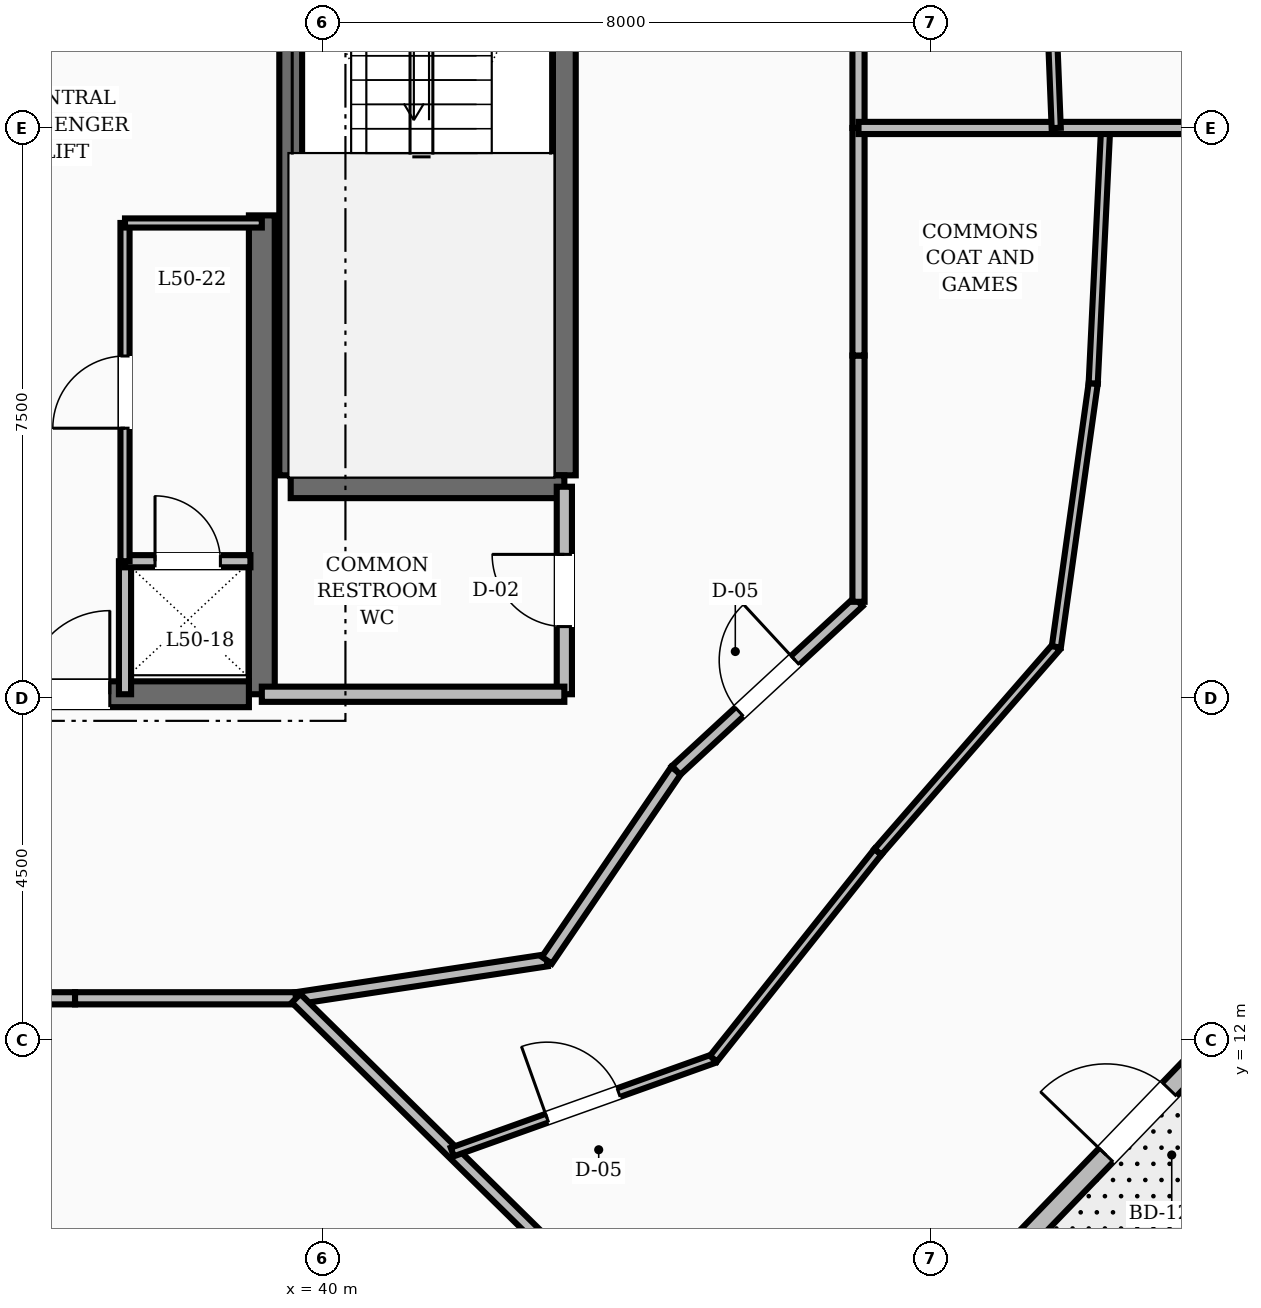
"""IFC4 building model, lengths in metres.
Left out: names, types, materials, properties, quantities, classifications, styles, units other than length and angle.
Written with IfcOpenShell. Run it as: python <this file> out.ifc"""

import sys

from ifc_helpers import new_model, si_unit, direction, frame, frame_2d, origin, place, context, subcontext, project, spatial, rectangle, extrude, element, fill, save


model = new_model("IFC4")
c1 = context("Model", 3, precision=1e-05, world=origin(), true_north=direction((0.0, 1.0)))
c2 = subcontext(c1, "Body", "Model", "MODEL_VIEW")
j1 = project(units=[si_unit("LENGTHUNIT", "METRE"), si_unit("PLANEANGLEUNIT", "RADIAN")], contexts=[c1])
p1 = place(None, origin())
s1 = spatial("IfcSite", under=j1, at=p1, CompositionType="ELEMENT")
p2 = place(p1, origin())
s2 = spatial("IfcBuilding", under=s1, at=p2, CompositionType="ELEMENT")
p3 = place(p2, frame((0.0, 0.0, 192.8)))
s3 = spatial("IfcBuildingStorey", under=s2, at=p3, CompositionType="ELEMENT", Elevation=192.8)
p4 = place(p3, frame((39.2, 16.55, 0.0), z_axis=(0.0, 0.0, 1.0), x_axis=(0.0, 1.0, 0.0)))
e1 = element("IfcWall", 1, at=p4, inside=s3, PredefinedType="SHEAR", context=c2, shape_type="SweptSolid", body=[
    extrude(rectangle(XDim=6.3, YDim=0.34, at=frame_2d((3.15, 0.0))), origin(), (0.0, 0.0, 1.0), 3.6),
])
p5 = place(p3, frame((35.8, 16.55, 0.0), z_axis=(0.0, 0.0, 1.0), x_axis=(1.0, 0.0, 0.0)))
e2 = element("IfcWall", 2, at=p5, inside=s3, PredefinedType="SHEAR", context=c2, shape_type="SweptSolid", body=[
    extrude(rectangle(XDim=3.23, YDim=0.34, at=frame_2d((1.615, 0.0))), origin(), (0.0, 0.0, 1.0), 3.6),
])
p6 = place(p5, frame((0.3, 0.0, 0.0)))
e3 = element("IfcOpeningElement", 3, at=p6, cuts=e2, PredefinedType="OPENING", context=c2, shape_type="SweptSolid", body=[
    extrude(rectangle(XDim=1.1, YDim=2.1, at=frame_2d((0.55, 1.05))), frame((0.0, 0.18, 0.0), z_axis=(0.0, -1.0, 0.0), x_axis=(1.0, 0.0, 0.0)), (0.0, 0.0, 1.0), 0.36),
])
for number, where, z_axis, x_axis in (
    (4, (43.18, 19.43, 0.0), (0.0, 0.0, 1.0), (0.0, 1.0, 0.0)),
    (5, (39.58, 19.43, 0.0), (0.0, 0.0, 1.0), (0.0, 1.0, 0.0)),
):
    element("IfcWall", number, at=place(p3, frame(where, z_axis=z_axis, x_axis=x_axis)), inside=s3, PredefinedType="SHEAR", context=c2, shape_type="SweptSolid", body=[
        extrude(rectangle(XDim=8.74, YDim=0.3, at=frame_2d((4.37, 0.0))), origin(), (0.0, 0.0, 1.0), 3.6),
    ])
p7 = place(p3, frame((39.58, 19.28, 0.0), z_axis=(0.0, 0.0, 1.0), x_axis=(1.0, 0.0, 0.0)))
e6 = element("IfcWall", 6, at=p7, inside=s3, PredefinedType="SHEAR", context=c2, shape_type="SweptSolid", body=[
    extrude(rectangle(XDim=3.6, YDim=0.3, at=frame_2d((1.8, 0.0))), origin(), (0.0, 0.0, 1.0), 3.6),
])
p8 = place(p3, frame((49.211, 9.349, 0.0), z_axis=(0.0, 0.0, 1.0), x_axis=(0.694057872199, 0.719919210772, 0.0)))
e7 = element("IfcWall", 7, at=p8, inside=s3, PredefinedType="STANDARD", context=c2, shape_type="SweptSolid", body=[
    extrude(rectangle(XDim=4.362, YDim=0.26, at=frame_2d((2.181, 0.0))), origin(), (0.0, 0.0, 1.0), 2.82),
])
p9 = place(p8, frame((1.581, 0.0, 0.0)))
e8 = element("IfcOpeningElement", 8, at=p9, cuts=e7, PredefinedType="OPENING", context=c2, shape_type="SweptSolid", body=[
    extrude(rectangle(XDim=1.2, YDim=2.15, at=frame_2d((0.6, 1.075))), frame((0.0, 0.14, 0.0), z_axis=(0.0, -1.0, 0.0), x_axis=(1.0, 0.0, 0.0)), (0.0, 0.0, 1.0), 0.28),
])
p10 = place(p3, frame((43.18, 16.55, 0.0), z_axis=(0.0, 0.0, 1.0), x_axis=(0.0, 1.0, 0.0)))
e9 = element("IfcWall", 9, at=p10, inside=s3, PredefinedType="SOLIDWALL", context=c2, shape_type="SweptSolid", body=[
    extrude(rectangle(XDim=2.73, YDim=0.2, at=frame_2d((1.365, 0.0))), origin(), (0.0, 0.0, 1.0), 2.8),
])
p11 = place(p10, frame((0.89, 0.0, 0.0)))
e10 = element("IfcOpeningElement", 10, at=p11, cuts=e9, PredefinedType="OPENING", context=c2, shape_type="SweptSolid", body=[
    extrude(rectangle(XDim=0.95, YDim=2.1, at=frame_2d((0.475, 1.05))), frame((0.0, 0.11, 0.0), z_axis=(0.0, -1.0, 0.0), x_axis=(1.0, 0.0, 0.0)), (0.0, 0.0, 1.0), 0.22),
])
p12 = place(p3, frame((39.2, 16.55, 0.0), z_axis=(0.0, 0.0, 1.0), x_axis=(1.0, 0.0, 0.0)))
e11 = element("IfcWall", 11, at=p12, inside=s3, PredefinedType="SOLIDWALL", context=c2, shape_type="SweptSolid", body=[
    extrude(rectangle(XDim=3.98, YDim=0.2, at=frame_2d((1.99, 0.0))), origin(), (0.0, 0.0, 1.0), 2.8),
])
p13 = place(p3, frame((37.4, 16.55, 0.0), z_axis=(0.0, 0.0, 1.0), x_axis=(0.0, 1.0, 0.0)))
e12 = element("IfcWall", 12, at=p13, inside=s3, PredefinedType="SOLIDWALL", context=c2, shape_type="SweptSolid", body=[
    extrude(rectangle(XDim=1.75, YDim=0.16, at=frame_2d((0.875, 0.0))), origin(), (0.0, 0.0, 1.0), 2.8),
])
p14 = place(p3, frame((37.4, 18.3, 0.0), z_axis=(0.0, 0.0, 1.0), x_axis=(1.0, 0.0, 0.0)))
e13 = element("IfcWall", 13, at=p14, inside=s3, PredefinedType="SOLIDWALL", context=c2, shape_type="SweptSolid", body=[
    extrude(rectangle(XDim=1.65, YDim=0.16, at=frame_2d((0.825, 0.0))), origin(), (0.0, 0.0, 1.0), 2.8),
])
p15 = place(p14, frame((0.395, 0.0, 0.0)))
e14 = element("IfcOpeningElement", 14, at=p15, cuts=e13, PredefinedType="OPENING", context=c2, shape_type="SweptSolid", body=[
    extrude(rectangle(XDim=0.86, YDim=2.1, at=frame_2d((0.43, 1.05))), frame((0.0, 0.09, 0.0), z_axis=(0.0, -1.0, 0.0), x_axis=(1.0, 0.0, 0.0)), (0.0, 0.0, 1.0), 0.18),
])
p16 = place(p3, frame((37.4, 18.3, 0.0), z_axis=(0.0, 0.0, 1.0), x_axis=(0.0, 1.0, 0.0)))
e15 = element("IfcWall", 15, at=p16, inside=s3, PredefinedType="PARTITIONING", context=c2, shape_type="SweptSolid", body=[
    extrude(rectangle(XDim=4.45, YDim=0.12, at=frame_2d((2.225, 0.0))), origin(), (0.0, 0.0, 1.0), 2.8),
])
p17 = place(p16, frame((1.75, 0.0, 0.0)))
e16 = element("IfcOpeningElement", 16, at=p17, cuts=e15, PredefinedType="OPENING", context=c2, shape_type="SweptSolid", body=[
    extrude(rectangle(XDim=0.95, YDim=2.1, at=frame_2d((0.475, 1.05))), frame((0.0, 0.07, 0.0), z_axis=(0.0, -1.0, 0.0), x_axis=(1.0, 0.0, 0.0)), (0.0, 0.0, 1.0), 0.14),
])
p18 = place(p3, frame((37.4, 22.75, 0.0), z_axis=(0.0, 0.0, 1.0), x_axis=(1.0, 0.0, 0.0)))
e17 = element("IfcWall", 17, at=p18, inside=s3, PredefinedType="PARTITIONING", context=c2, shape_type="SweptSolid", body=[
    extrude(rectangle(XDim=1.8, YDim=0.12, at=frame_2d((0.9, 0.0))), origin(), (0.0, 0.0, 1.0), 2.8),
])
p19 = place(p3, frame((47.05, 24.0, 0.0), z_axis=(0.0, 0.0, 1.0), x_axis=(0.0, 1.0, 0.0)))
e18 = element("IfcWall", 18, at=p19, inside=s3, PredefinedType="SOLIDWALL", context=c2, shape_type="SweptSolid", body=[
    extrude(rectangle(XDim=2.994, YDim=0.16, at=frame_2d((1.497, 0.0))), origin(), (0.0, 0.0, 1.0), 2.8),
])
p20 = place(p3, frame((34.278, 12.55, 0.0), z_axis=(0.0, 0.0, 1.0), x_axis=(1.0, 0.0, 0.0)))
e19 = element("IfcWall", 19, at=p20, inside=s3, PredefinedType="SOLIDWALL", context=c2, shape_type="SweptSolid", body=[
    extrude(rectangle(XDim=2.465, YDim=0.16, at=frame_2d((1.232, 0.0))), origin(), (0.0, 0.0, 1.0), 2.8),
])
p21 = place(p20, frame((0.758, 0.0, 0.0)))
e20 = element("IfcOpeningElement", 20, at=p21, cuts=e19, PredefinedType="OPENING", context=c2, shape_type="SweptSolid", body=[
    extrude(rectangle(XDim=0.95, YDim=2.1, at=frame_2d((0.475, 1.05))), frame((0.0, 0.09, 0.0), z_axis=(0.0, -1.0, 0.0), x_axis=(1.0, 0.0, 0.0)), (0.0, 0.0, 1.0), 0.18),
])
p22 = place(p3, frame((36.743, 12.55, 0.0), z_axis=(0.0, 0.0, 1.0), x_axis=(1.0, 0.0, 0.0)))
e21 = element("IfcWall", 21, at=p22, inside=s3, PredefinedType="SOLIDWALL", context=c2, shape_type="SweptSolid", body=[
    extrude(rectangle(XDim=2.908, YDim=0.16, at=frame_2d((1.454, 0.0))), origin(), (0.0, 0.0, 1.0), 2.8),
])
p23 = place(p3, frame((39.651, 12.55, 0.0), z_axis=(0.0, 0.0, 1.0), x_axis=(0.988710906508, 0.149835721217, 0.0)))
e22 = element("IfcWall", 22, at=p23, inside=s3, PredefinedType="SOLIDWALL", context=c2, shape_type="SweptSolid", body=[
    extrude(rectangle(XDim=3.337, YDim=0.16, at=frame_2d((1.668, 0.0))), origin(), (0.0, 0.0, 1.0), 2.8),
])
p24 = place(p3, frame((42.95, 13.05, 0.0), z_axis=(0.0, 0.0, 1.0), x_axis=(0.562674669208, 0.826678423955, 0.0)))
e23 = element("IfcWall", 23, at=p24, inside=s3, PredefinedType="SOLIDWALL", context=c2, shape_type="SweptSolid", body=[
    extrude(rectangle(XDim=3.021, YDim=0.16, at=frame_2d((1.511, 0.0))), origin(), (0.0, 0.0, 1.0), 2.8),
])
p25 = place(p3, frame((44.65, 15.548, 0.0), z_axis=(0.0, 0.0, 1.0), x_axis=(0.734347936521, 0.678773237633, 0.0)))
e24 = element("IfcWall", 24, at=p25, inside=s3, PredefinedType="SOLIDWALL", context=c2, shape_type="SweptSolid", body=[
    extrude(rectangle(XDim=3.268, YDim=0.16, at=frame_2d((1.634, 0.0))), origin(), (0.0, 0.0, 1.0), 2.8),
])
p26 = place(p25, frame((1.134, 0.0, 0.0)))
e25 = element("IfcOpeningElement", 25, at=p26, cuts=e24, PredefinedType="OPENING", context=c2, shape_type="SweptSolid", body=[
    extrude(rectangle(XDim=1.0, YDim=2.1, at=frame_2d((0.5, 1.05))), frame((0.0, 0.09, 0.0), z_axis=(0.0, -1.0, 0.0), x_axis=(1.0, 0.0, 0.0)), (0.0, 0.0, 1.0), 0.18),
])
p27 = place(p3, frame((47.05, 17.766, 0.0), z_axis=(0.0, 0.0, 1.0), x_axis=(0.0, 1.0, 0.0)))
e26 = element("IfcWall", 26, at=p27, inside=s3, PredefinedType="SOLIDWALL", context=c2, shape_type="SweptSolid", body=[
    extrude(rectangle(XDim=3.24, YDim=0.16, at=frame_2d((1.62, 0.0))), origin(), (0.0, 0.0, 1.0), 2.8),
])
p28 = place(p3, frame((47.05, 21.006, 0.0), z_axis=(0.0, 0.0, 1.0), x_axis=(0.0, 1.0, 0.0)))
e27 = element("IfcWall", 27, at=p28, inside=s3, PredefinedType="SOLIDWALL", context=c2, shape_type="SweptSolid", body=[
    extrude(rectangle(XDim=2.994, YDim=0.16, at=frame_2d((1.497, 0.0))), origin(), (0.0, 0.0, 1.0), 2.8),
])
p29 = place(p3, frame((39.651, 12.55, 0.0), z_axis=(0.0, 0.0, 1.0), x_axis=(0.71282340305, -0.701343564927, 0.0)))
e28 = element("IfcWall", 28, at=p29, inside=s3, PredefinedType="SOLIDWALL", context=c2, shape_type="SweptSolid", body=[
    extrude(rectangle(XDim=8.188, YDim=0.16, at=frame_2d((4.094, 0.0))), origin(), (0.0, 0.0, 1.0), 2.8),
])
p30 = place(p3, frame((41.706, 10.528, 0.0), z_axis=(0.0, 0.0, 1.0), x_axis=(0.941757051858, 0.33629400125, 0.0)))
e29 = element("IfcWall", 29, at=p30, inside=s3, PredefinedType="PARTITIONING", context=c2, shape_type="SweptSolid", body=[
    extrude(rectangle(XDim=3.648, YDim=0.12, at=frame_2d((1.824, 0.0))), origin(), (0.0, 0.0, 1.0), 2.8),
])
p31 = place(p30, frame((1.324, 0.0, 0.0)))
e30 = element("IfcOpeningElement", 30, at=p31, cuts=e29, PredefinedType="OPENING", context=c2, shape_type="SweptSolid", body=[
    extrude(rectangle(XDim=1.0, YDim=2.1, at=frame_2d((0.5, 1.05))), frame((0.0, 0.07, 0.0), z_axis=(0.0, -1.0, 0.0), x_axis=(1.0, 0.0, 0.0)), (0.0, 0.0, 1.0), 0.14),
])
p32 = place(p3, frame((45.141, 11.755, 0.0), z_axis=(0.0, 0.0, 1.0), x_axis=(0.622346697339, 0.782741712387, 0.0)))
e31 = element("IfcWall", 31, at=p32, inside=s3, PredefinedType="PARTITIONING", context=c2, shape_type="SweptSolid", body=[
    extrude(rectangle(XDim=3.478, YDim=0.12, at=frame_2d((1.739, 0.0))), origin(), (0.0, 0.0, 1.0), 2.8),
])
p33 = place(p3, frame((47.306, 14.477, 0.0), z_axis=(0.0, 0.0, 1.0), x_axis=(0.656655448043, 0.75419070702, 0.0)))
e32 = element("IfcWall", 32, at=p33, inside=s3, PredefinedType="PARTITIONING", context=c2, shape_type="SweptSolid", body=[
    extrude(rectangle(XDim=3.574, YDim=0.12, at=frame_2d((1.787, 0.0))), origin(), (0.0, 0.0, 1.0), 2.8),
])
p34 = place(p3, frame((49.653, 17.173, 0.0), z_axis=(0.0, 0.0, 1.0), x_axis=(0.138452193773, 0.990369118076, 0.0)))
e33 = element("IfcWall", 33, at=p34, inside=s3, PredefinedType="PARTITIONING", context=c2, shape_type="SweptSolid", body=[
    extrude(rectangle(XDim=3.5, YDim=0.12, at=frame_2d((1.75, 0.0))), origin(), (0.0, 0.0, 1.0), 2.8),
])
p35 = place(p3, frame((50.138, 20.639, 0.0), z_axis=(0.0, 0.0, 1.0), x_axis=(0.048689007284, 0.998813986971, 0.0)))
e34 = element("IfcWall", 34, at=p35, inside=s3, PredefinedType="PARTITIONING", context=c2, shape_type="SweptSolid", body=[
    extrude(rectangle(XDim=3.365, YDim=0.12, at=frame_2d((1.682, 0.0))), origin(), (0.0, 0.0, 1.0), 2.8),
])
p36 = place(p3, frame((47.05, 24.0, 0.0), z_axis=(0.0, 0.0, 1.0), x_axis=(1.0, 0.0, 0.0)))
e35 = element("IfcWall", 35, at=p36, inside=s3, PredefinedType="SOLIDWALL", context=c2, shape_type="SweptSolid", body=[
    extrude(rectangle(XDim=9.24, YDim=0.16, at=frame_2d((4.62, 0.0))), origin(), (0.0, 0.0, 1.0), 2.8),
])
p37 = place(p3, frame((49.651, 24.0, 0.0), z_axis=(0.0, 0.0, 1.0), x_axis=(-0.039778354948, 0.999208528025, 0.0)))
e36 = element("IfcWall", 36, at=p37, inside=s3, PredefinedType="PARTITIONING", context=c2, shape_type="SweptSolid", body=[
    extrude(rectangle(XDim=3.29, YDim=0.12, at=frame_2d((1.645, 0.0))), origin(), (0.0, 0.0, 1.0), 2.8),
])
p38 = place(p3, frame((51.695, 24.0, 0.0), z_axis=(0.0, 0.0, 1.0), x_axis=(-0.129733767917, 0.99154886388, 0.0)))
e37 = element("IfcWall", 37, at=p38, inside=s3, PredefinedType="PARTITIONING", context=c2, shape_type="SweptSolid", body=[
    extrude(rectangle(XDim=7.142, YDim=0.12, at=frame_2d((3.571, 0.0))), origin(), (0.0, 0.0, 1.0), 2.8),
])
p39 = place(p38, frame((4.264, 0.0, 0.0)))
e38 = element("IfcOpeningElement", 38, at=p39, cuts=e37, PredefinedType="OPENING", context=c2, shape_type="SweptSolid", body=[
    extrude(rectangle(XDim=0.95, YDim=2.1, at=frame_2d((0.475, 1.05))), frame((0.0, 0.07, 0.0), z_axis=(0.0, -1.0, 0.0), x_axis=(1.0, 0.0, 0.0)), (0.0, 0.0, 1.0), 0.14),
])
p40 = place(p9, origin())
e39 = element("IfcDoor", 39, at=p40, inside=s3, OperationType="SINGLE_SWING_LEFT", PredefinedType="DOOR", context=c2, shape_type="SweptSolid", body=[
    extrude(rectangle(XDim=1.2, YDim=2.15, at=frame_2d((0.6, 1.075))), frame((0.0, 0.025, 0.0), z_axis=(0.0, -1.0, 0.0), x_axis=(1.0, 0.0, 0.0)), (0.0, 0.0, 1.0), 0.05),
])
fill(e8, e39)
p41 = place(p11, origin())
e40 = element("IfcDoor", 40, at=p41, inside=s3, OperationType="SINGLE_SWING_RIGHT", PredefinedType="DOOR", context=c2, shape_type="SweptSolid", body=[
    extrude(rectangle(XDim=0.95, YDim=2.1, at=frame_2d((0.475, 1.05))), frame((0.0, 0.025, 0.0), z_axis=(0.0, -1.0, 0.0), x_axis=(1.0, 0.0, 0.0)), (0.0, 0.0, 1.0), 0.05),
])
fill(e10, e40)
p42 = place(p6, origin())
e41 = element("IfcDoor", 41, at=p42, inside=s3, OperationType="SINGLE_SWING_RIGHT", PredefinedType="DOOR", context=c2, shape_type="SweptSolid", body=[
    extrude(rectangle(XDim=1.1, YDim=2.1, at=frame_2d((0.55, 1.05))), frame((0.0, 0.025, 0.0), z_axis=(0.0, -1.0, 0.0), x_axis=(1.0, 0.0, 0.0)), (0.0, 0.0, 1.0), 0.05),
])
fill(e3, e41)
p43 = place(p15, origin())
e42 = element("IfcDoor", 42, at=p43, inside=s3, OperationType="SINGLE_SWING_LEFT", PredefinedType="TRAPDOOR", context=c2, shape_type="SweptSolid", body=[
    extrude(rectangle(XDim=0.86, YDim=2.1, at=frame_2d((0.43, 1.05))), frame((0.0, 0.025, 0.0), z_axis=(0.0, -1.0, 0.0), x_axis=(1.0, 0.0, 0.0)), (0.0, 0.0, 1.0), 0.05),
])
fill(e14, e42)
p44 = place(p17, origin())
e43 = element("IfcDoor", 43, at=p44, inside=s3, OperationType="SINGLE_SWING_LEFT", PredefinedType="DOOR", context=c2, shape_type="SweptSolid", body=[
    extrude(rectangle(XDim=0.95, YDim=2.1, at=frame_2d((0.475, 1.05))), frame((0.0, 0.025, 0.0), z_axis=(0.0, -1.0, 0.0), x_axis=(1.0, 0.0, 0.0)), (0.0, 0.0, 1.0), 0.05),
])
fill(e16, e43)
p45 = place(p26, origin())
e44 = element("IfcDoor", 44, at=p45, inside=s3, OperationType="SINGLE_SWING_RIGHT", PredefinedType="DOOR", context=c2, shape_type="SweptSolid", body=[
    extrude(rectangle(XDim=1.0, YDim=2.1, at=frame_2d((0.5, 1.05))), frame((0.0, 0.025, 0.0), z_axis=(0.0, -1.0, 0.0), x_axis=(1.0, 0.0, 0.0)), (0.0, 0.0, 1.0), 0.05),
])
fill(e25, e44)
p46 = place(p31, origin())
e45 = element("IfcDoor", 45, at=p46, inside=s3, OperationType="SINGLE_SWING_LEFT", PredefinedType="DOOR", context=c2, shape_type="SweptSolid", body=[
    extrude(rectangle(XDim=1.0, YDim=2.1, at=frame_2d((0.5, 1.05))), frame((0.0, 0.025, 0.0), z_axis=(0.0, -1.0, 0.0), x_axis=(1.0, 0.0, 0.0)), (0.0, 0.0, 1.0), 0.05),
])
fill(e30, e45)
save(model, sys.argv[1])
